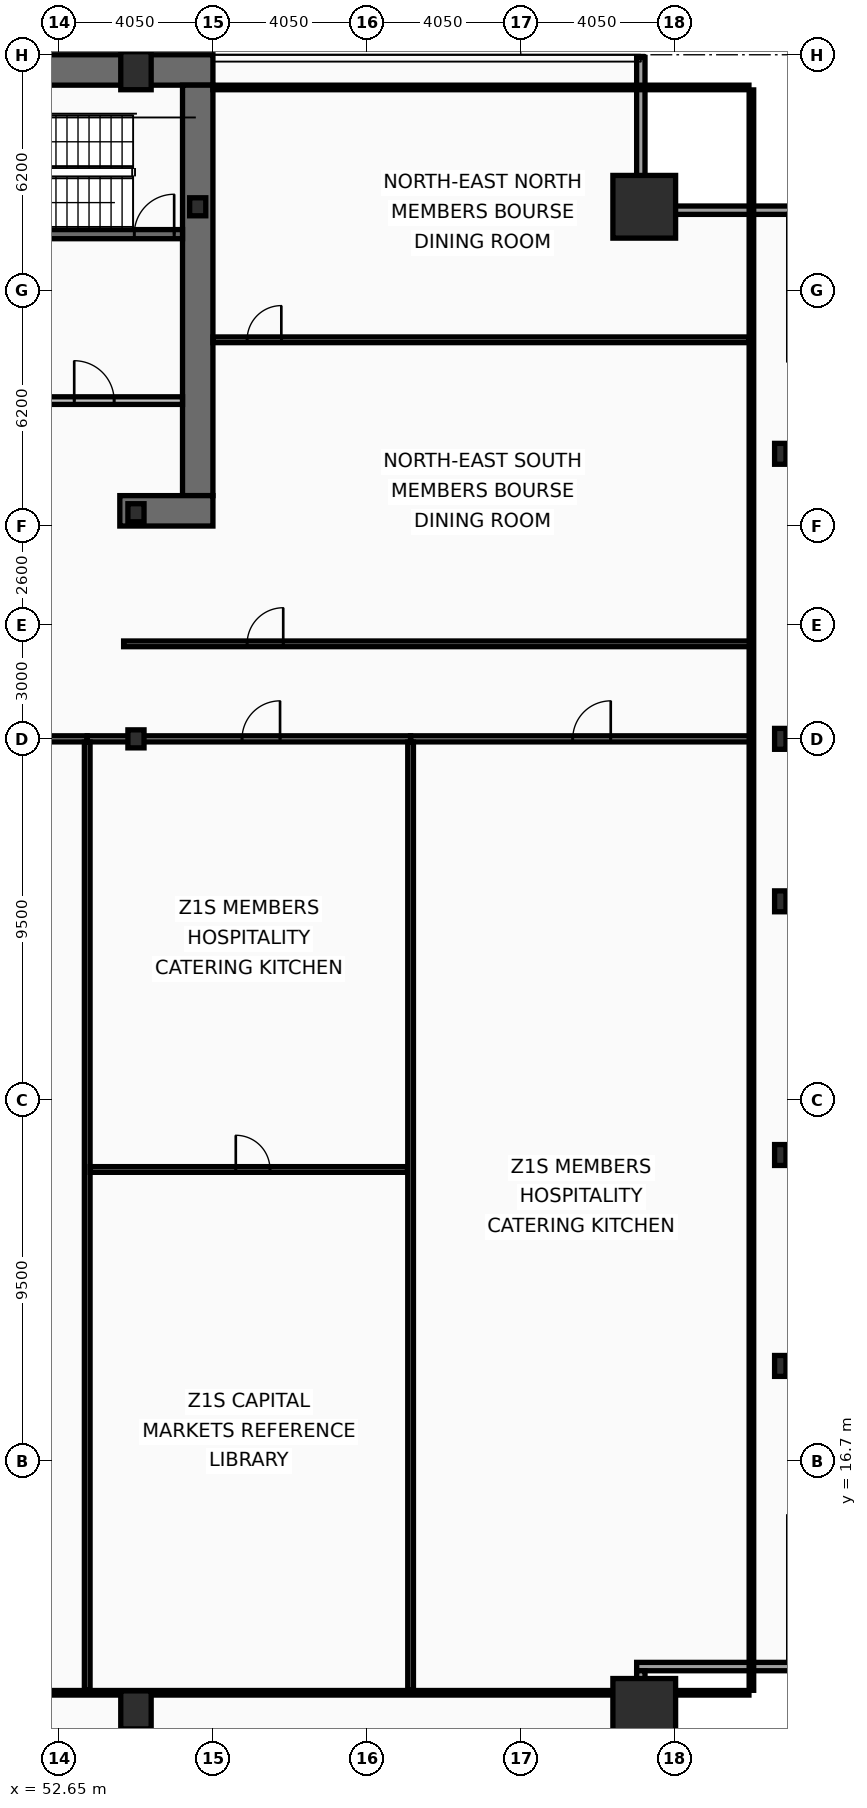
"""IFC4 building model, lengths in metres.
Left out: names, types, materials, properties, quantities, classifications, styles, units other than length and angle.
Written with IfcOpenShell. Run it as: python <this file> out.ifc"""

import sys

from ifc_helpers import new_model, si_unit, direction, frame, frame_2d, origin, origin_2d, place, context, subcontext, project, spatial, rectangle, hollow_rectangle, i_section, extrude, element, fill, save


model = new_model("IFC4")
c1 = context("Model", 3, precision=1e-05, world=origin(), true_north=direction((0.0, 1.0)))
c2 = subcontext(c1, "Body", "Model", "MODEL_VIEW")
j1 = project(units=[si_unit("LENGTHUNIT", "METRE"), si_unit("PLANEANGLEUNIT", "RADIAN")], contexts=[c1])
p1 = place(None, origin())
s1 = spatial("IfcSite", under=j1, at=p1, CompositionType="ELEMENT")
p2 = place(p1, origin())
s2 = spatial("IfcBuilding", under=s1, at=p2, CompositionType="ELEMENT")
p3 = place(p2, frame((0.0, 0.0, 49.8)))
s3 = spatial("IfcBuildingStorey", under=s2, at=p3, CompositionType="ELEMENT", Elevation=49.8)
p4 = place(p3, frame((16.2, 53.3, 0.0), z_axis=(0.0, 0.0, 1.0), x_axis=(1.0, 0.0, 0.0)))
e1 = element("IfcWall", 1, at=p4, inside=s3, PredefinedType="SHEAR", context=c2, shape_type="SweptSolid", body=[
    extrude(rectangle(XDim=40.5, YDim=0.8, at=frame_2d((20.25, 0.0))), origin(), (0.0, 0.0, 1.0), 3.82),
])
p5 = place(p3, frame((56.3, 52.9, 0.0), z_axis=(0.0, 0.0, 1.0), x_axis=(0.0, -1.0, 0.0)))
e2 = element("IfcWall", 2, at=p5, inside=s3, PredefinedType="SHEAR", context=c2, shape_type="SweptSolid", body=[
    extrude(rectangle(XDim=10.8, YDim=0.8, at=frame_2d((5.4, 0.0))), origin(), (0.0, 0.0, 1.0), 3.82),
])
p6 = place(p3, frame((56.7, 41.7, 0.0), z_axis=(0.0, 0.0, 1.0), x_axis=(-1.0, 0.0, 0.0)))
e3 = element("IfcWall", 3, at=p6, inside=s3, PredefinedType="SHEAR", context=c2, shape_type="SweptSolid", body=[
    extrude(rectangle(XDim=2.45, YDim=0.8, at=frame_2d((1.225, 0.0))), origin(), (0.0, 0.0, 1.0), 3.82),
])
p7 = place(p3, frame((48.63, 48.98, 0.0), z_axis=(0.0, 0.0, 1.0), x_axis=(1.0, 0.0, 0.0)))
e4 = element("IfcWall", 4, at=p7, inside=s3, PredefinedType="SHEAR", context=c2, shape_type="SweptSolid", body=[
    extrude(rectangle(XDim=7.27, YDim=0.24, at=frame_2d((3.635, 0.0))), origin(), (0.0, 0.0, 1.0), 3.82),
])
p8 = place(p7, frame((6.0, 0.0, 0.0)))
e5 = element("IfcOpeningElement", 5, at=p8, cuts=e4, PredefinedType="OPENING", context=c2, shape_type="SweptSolid", body=[
    extrude(rectangle(XDim=1.05, YDim=2.15, at=frame_2d((0.525, 1.075))), frame((0.0, 0.13, 0.0), z_axis=(0.0, -1.0, 0.0), x_axis=(1.0, 0.0, 0.0)), (0.0, 0.0, 1.0), 0.26),
])
for number, where, z_axis, x_axis in (
    (6, (68.05, 10.15, 0.0), (0.0, 0.0, 1.0), (1.0, 0.0, 0.0)),
    (7, (68.05, 49.7, 0.0), (0.0, 0.0, 1.0), (1.0, 0.0, 0.0)),
):
    element("IfcColumn", number, at=place(p3, frame(where, z_axis=z_axis, x_axis=x_axis)), inside=s3, PredefinedType="COLUMN", context=c2, shape_type="SweptSolid", body=[
        extrude(hollow_rectangle(XDim=1.65, YDim=1.65, WallThickness=0.075, at=origin_2d()), origin(), (0.0, 0.0, 1.0), 4.0),
    ])
for number, where, z_axis, x_axis in (
    (8, (54.675, 10.15, 0.0), (0.0, 0.0, 1.0), (1.0, 0.0, 0.0)),
    (9, (54.675, 53.28, 0.0), (0.0, 0.0, 1.0), (1.0, 0.0, 0.0)),
):
    element("IfcColumn", number, at=place(p3, frame(where, z_axis=z_axis, x_axis=x_axis)), inside=s3, PredefinedType="COLUMN", context=c2, shape_type="SweptSolid", body=[
        extrude(hollow_rectangle(XDim=0.8, YDim=1.0, WallThickness=0.055, at=origin_2d()), origin(), (0.0, 0.0, 1.0), 4.0),
    ])
for number, where, z_axis, x_axis in (
    (10, (71.63, 19.2, 0.0), (0.0, 0.0, 1.0), (1.0, 0.0, 0.0)),
    (11, (71.63, 24.75, 0.0), (0.0, 0.0, 1.0), (1.0, 0.0, 0.0)),
    (12, (71.63, 31.425, 0.0), (0.0, 0.0, 1.0), (1.0, 0.0, 0.0)),
    (13, (71.63, 35.7, 0.0), (0.0, 0.0, 1.0), (1.0, 0.0, 0.0)),
    (14, (71.63, 43.2, 0.0), (0.0, 0.0, 1.0), (1.0, 0.0, 0.0)),
):
    element("IfcColumn", number, at=place(p3, frame(where, z_axis=z_axis, x_axis=x_axis)), inside=s3, PredefinedType="COLUMN", context=c2, shape_type="SweptSolid", body=[
        extrude(i_section(OverallWidth=0.3, OverallDepth=0.55, WebThickness=0.015, FlangeThickness=0.029, at=origin_2d()), origin(), (0.0, 0.0, 1.0), 4.0),
    ])
for number, where, z_axis, x_axis in (
    (15, (56.3, 49.7, 0.0), (0.0, 0.0, 1.0), (1.0, 0.0, 0.0)),
    (16, (54.675, 35.7, 0.0), (0.0, 0.0, 1.0), (1.0, 0.0, 0.0)),
    (17, (54.675, 41.65, 0.0), (0.0, 0.0, 1.0), (1.0, 0.0, 0.0)),
):
    element("IfcColumn", number, at=place(p3, frame(where, z_axis=z_axis, x_axis=x_axis)), inside=s3, PredefinedType="COLUMN", context=c2, shape_type="SweptSolid", body=[
        extrude(i_section(OverallWidth=0.424, OverallDepth=0.474, WebThickness=0.048, FlangeThickness=0.077, at=origin_2d()), origin(), (0.0, 0.0, 1.0), 4.0),
    ])
p9 = place(p3, frame((67.96, 53.63, 0.0), z_axis=(0.0, 0.0, 1.0), x_axis=(0.0, -1.0, 0.0)))
e18 = element("IfcWall", 18, at=p9, inside=s3, PredefinedType="SOLIDWALL", context=c2, shape_type="SweptSolid", body=[
    extrude(rectangle(XDim=3.91, YDim=0.22, at=frame_2d((1.955, 0.0))), origin(), (0.0, 0.0, 1.0), 3.16),
])
for number, where, z_axis, x_axis in (
    (19, (67.85, 49.61, 0.0), (0.0, 0.0, 1.0), (1.0, 0.0, 0.0)),
    (20, (72.07, 11.29, 0.0), (0.0, 0.0, 1.0), (-1.0, 0.0, 0.0)),
):
    element("IfcWall", number, at=place(p3, frame(where, z_axis=z_axis, x_axis=x_axis)), inside=s3, PredefinedType="SOLIDWALL", context=c2, shape_type="SweptSolid", body=[
        extrude(rectangle(XDim=4.22, YDim=0.22, at=frame_2d((2.11, 0.0))), origin(), (0.0, 0.0, 1.0), 3.16),
    ])
p10 = place(p3, frame((67.96, 11.18, 0.0), z_axis=(0.0, 0.0, 1.0), x_axis=(0.0, -1.0, 0.0)))
e21 = element("IfcWall", 21, at=p10, inside=s3, PredefinedType="SOLIDWALL", context=c2, shape_type="SweptSolid", body=[
    extrude(rectangle(XDim=3.91, YDim=0.22, at=frame_2d((1.955, 0.0))), origin(), (0.0, 0.0, 1.0), 3.16),
])
p11 = place(p3, frame((51.9, 44.6, 0.0), z_axis=(0.0, 0.0, 1.0), x_axis=(1.0, 0.0, 0.0)))
e22 = element("IfcWall", 22, at=p11, inside=s3, PredefinedType="PARTITIONING", context=c2, shape_type="SweptSolid", body=[
    extrude(rectangle(XDim=4.0, YDim=0.2, at=frame_2d((2.0, 0.0))), origin(), (0.0, 0.0, 1.0), 3.82),
])
p12 = place(p11, frame((1.15, 0.0, 0.0)))
e23 = element("IfcOpeningElement", 23, at=p12, cuts=e22, PredefinedType="OPENING", context=c2, shape_type="SweptSolid", body=[
    extrude(rectangle(XDim=1.05, YDim=2.15, at=frame_2d((0.525, 1.075))), frame((0.0, 0.11, 0.0), z_axis=(0.0, -1.0, 0.0), x_axis=(1.0, 0.0, 0.0)), (0.0, 0.0, 1.0), 0.22),
])
p13 = place(p3, frame((54.35, 38.2, 0.0), z_axis=(0.0, 0.0, 1.0), x_axis=(1.0, 0.0, 0.0)))
e24 = element("IfcWall", 24, at=p13, inside=s3, PredefinedType="PARTITIONING", context=c2, shape_type="SweptSolid", body=[
    extrude(rectangle(XDim=16.52, YDim=0.15, at=frame_2d((8.26, 0.0))), origin(), (0.0, 0.0, 1.0), 3.01),
])
p14 = place(p13, frame((3.25, 0.0, 0.0)))
e25 = element("IfcOpeningElement", 25, at=p14, cuts=e24, PredefinedType="OPENING", context=c2, shape_type="SweptSolid", body=[
    extrude(rectangle(XDim=0.95, YDim=2.05, at=frame_2d((0.475, 1.025))), frame((0.0, 0.085, 0.0), z_axis=(0.0, -1.0, 0.0), x_axis=(1.0, 0.0, 0.0)), (0.0, 0.0, 1.0), 0.17),
])
p15 = place(p3, frame((56.7, 46.2, 0.0), z_axis=(0.0, 0.0, 1.0), x_axis=(1.0, 0.0, 0.0)))
e26 = element("IfcWall", 26, at=p15, inside=s3, PredefinedType="PARTITIONING", context=c2, shape_type="SweptSolid", body=[
    extrude(rectangle(XDim=14.105, YDim=0.15, at=frame_2d((7.052, 0.0))), origin(), (0.0, 0.0, 1.0), 3.16),
])
p16 = place(p15, frame((0.9, 0.0, 0.0)))
e27 = element("IfcOpeningElement", 27, at=p16, cuts=e26, PredefinedType="OPENING", context=c2, shape_type="SweptSolid", body=[
    extrude(rectangle(XDim=0.9, YDim=2.05, at=frame_2d((0.45, 1.025))), frame((0.0, 0.085, 0.0), z_axis=(0.0, -1.0, 0.0), x_axis=(1.0, 0.0, 0.0)), (0.0, 0.0, 1.0), 0.17),
])
p17 = place(p3, frame((35.595, 35.7, 0.0), z_axis=(0.0, 0.0, 1.0), x_axis=(1.0, 0.0, 0.0)))
e28 = element("IfcWall", 28, at=p17, inside=s3, PredefinedType="PARTITIONING", context=c2, shape_type="SweptSolid", body=[
    extrude(rectangle(XDim=17.797, YDim=0.16, at=frame_2d((8.899, 0.0))), origin(), (0.0, 0.0, 1.0), 3.01),
])
p18 = place(p17, frame((7.975, 0.0, 0.0)))
e29 = element("IfcOpeningElement", 29, at=p18, cuts=e28, PredefinedType="OPENING", context=c2, shape_type="SweptSolid", body=[
    extrude(rectangle(XDim=1.6, YDim=2.15, at=frame_2d((0.8, 1.075))), frame((0.0, 0.09, 0.0), z_axis=(0.0, -1.0, 0.0), x_axis=(1.0, 0.0, 0.0)), (0.0, 0.0, 1.0), 0.18),
])
p19 = place(p3, frame((53.392, 35.7, 0.0), z_axis=(0.0, 0.0, 1.0), x_axis=(1.0, 0.0, 0.0)))
e30 = element("IfcWall", 30, at=p19, inside=s3, PredefinedType="PARTITIONING", context=c2, shape_type="SweptSolid", body=[
    extrude(rectangle(XDim=8.51, YDim=0.16, at=frame_2d((4.255, 0.0))), origin(), (0.0, 0.0, 1.0), 3.01),
])
p20 = place(p19, frame((4.074, 0.0, 0.0)))
e31 = element("IfcOpeningElement", 31, at=p20, cuts=e30, PredefinedType="OPENING", context=c2, shape_type="SweptSolid", body=[
    extrude(rectangle(XDim=1.0, YDim=2.05, at=frame_2d((0.5, 1.025))), frame((0.0, 0.09, 0.0), z_axis=(0.0, -1.0, 0.0), x_axis=(1.0, 0.0, 0.0)), (0.0, 0.0, 1.0), 0.18),
])
p21 = place(p3, frame((53.392, 10.665, 0.0), z_axis=(0.0, 0.0, 1.0), x_axis=(0.0, 1.0, 0.0)))
e32 = element("IfcWall", 32, at=p21, inside=s3, PredefinedType="PARTITIONING", context=c2, shape_type="SweptSolid", body=[
    extrude(rectangle(XDim=24.95, YDim=0.15, at=frame_2d((12.475, 0.0))), origin(), (0.0, 0.0, 1.0), 3.21),
])
p22 = place(p3, frame((53.472, 24.369, 0.0), z_axis=(0.0, 0.0, 1.0), x_axis=(1.0, 0.0, 0.0)))
e33 = element("IfcWall", 33, at=p22, inside=s3, PredefinedType="PARTITIONING", context=c2, shape_type="SweptSolid", body=[
    extrude(rectangle(XDim=8.349, YDim=0.15, at=frame_2d((4.175, 0.0))), origin(), (0.0, 0.0, 1.0), 3.01),
])
p23 = place(p22, frame((3.829, 0.0, 0.0)))
e34 = element("IfcOpeningElement", 34, at=p23, cuts=e33, PredefinedType="OPENING", context=c2, shape_type="SweptSolid", body=[
    extrude(rectangle(XDim=0.9, YDim=2.05, at=frame_2d((0.45, 1.025))), frame((0.0, 0.085, 0.0), z_axis=(0.0, -1.0, 0.0), x_axis=(1.0, 0.0, 0.0)), (0.0, 0.0, 1.0), 0.17),
])
p24 = place(p3, frame((61.902, 35.7, 0.0), z_axis=(0.0, 0.0, 1.0), x_axis=(1.0, 0.0, 0.0)))
e35 = element("IfcWall", 35, at=p24, inside=s3, PredefinedType="PARTITIONING", context=c2, shape_type="SweptSolid", body=[
    extrude(rectangle(XDim=8.968, YDim=0.16, at=frame_2d((4.484, 0.0))), origin(), (0.0, 0.0, 1.0), 3.01),
])
p25 = place(p24, frame((4.267, 0.0, 0.0)))
e36 = element("IfcOpeningElement", 36, at=p25, cuts=e35, PredefinedType="OPENING", context=c2, shape_type="SweptSolid", body=[
    extrude(rectangle(XDim=1.0, YDim=2.05, at=frame_2d((0.5, 1.025))), frame((0.0, 0.09, 0.0), z_axis=(0.0, -1.0, 0.0), x_axis=(1.0, 0.0, 0.0)), (0.0, 0.0, 1.0), 0.18),
])
p26 = place(p3, frame((61.902, 10.665, 0.0), z_axis=(0.0, 0.0, 1.0), x_axis=(0.0, 1.0, 0.0)))
e37 = element("IfcWall", 37, at=p26, inside=s3, PredefinedType="PARTITIONING", context=c2, shape_type="SweptSolid", body=[
    extrude(rectangle(XDim=24.95, YDim=0.15, at=frame_2d((12.475, 0.0))), origin(), (0.0, 0.0, 1.0), 3.01),
])
p27 = place(p3, frame((70.87, 10.665, 0.0), z_axis=(0.0, 0.0, 1.0), x_axis=(0.0, 1.0, 0.0)))
e38 = element("IfcWall", 38, at=p27, inside=s3, PredefinedType="PARTITIONING", context=c2, shape_type="SweptSolid", body=[
    extrude(rectangle(XDim=42.11, YDim=0.12, at=frame_2d((21.055, 0.0))), origin(), (0.0, 0.0, 1.0), 3.01),
])
p28 = place(p3, frame((56.7, 52.84, 0.0), z_axis=(0.0, 0.0, 1.0), x_axis=(1.0, 0.0, 0.0)))
e39 = element("IfcWall", 39, at=p28, inside=s3, PredefinedType="PARTITIONING", context=c2, shape_type="SweptSolid", body=[
    extrude(rectangle(XDim=14.105, YDim=0.12, at=frame_2d((7.052, 0.0))), origin(), (0.0, 0.0, 1.0), 3.82),
])
p29 = place(p3, frame((2.095, 10.6, 0.0), z_axis=(0.0, 0.0, 1.0), x_axis=(1.0, 0.0, 0.0)))
e40 = element("IfcWall", 40, at=p29, inside=s3, PredefinedType="PARTITIONING", context=c2, shape_type="SweptSolid", body=[
    extrude(rectangle(XDim=68.71, YDim=0.12, at=frame_2d((34.355, 0.0))), origin(), (0.0, 0.0, 1.0), 3.01),
])
p30 = place(p8, origin())
e41 = element("IfcDoor", 41, at=p30, inside=s3, OperationType="SINGLE_SWING_RIGHT", PredefinedType="DOOR", context=c2, shape_type="SweptSolid", body=[
    extrude(rectangle(XDim=1.05, YDim=2.15, at=frame_2d((0.525, 1.075))), frame((0.0, 0.025, 0.0), z_axis=(0.0, -1.0, 0.0), x_axis=(1.0, 0.0, 0.0)), (0.0, 0.0, 1.0), 0.05),
])
fill(e5, e41)
p31 = place(p12, origin())
e42 = element("IfcDoor", 42, at=p31, inside=s3, OperationType="SINGLE_SWING_LEFT", PredefinedType="DOOR", context=c2, shape_type="SweptSolid", body=[
    extrude(rectangle(XDim=1.05, YDim=2.15, at=frame_2d((0.525, 1.075))), frame((0.0, 0.025, 0.0), z_axis=(0.0, -1.0, 0.0), x_axis=(1.0, 0.0, 0.0)), (0.0, 0.0, 1.0), 0.05),
])
fill(e23, e42)
p32 = place(p14, origin())
e43 = element("IfcDoor", 43, at=p32, inside=s3, OperationType="SINGLE_SWING_RIGHT", PredefinedType="DOOR", context=c2, shape_type="SweptSolid", body=[
    extrude(rectangle(XDim=0.95, YDim=2.05, at=frame_2d((0.475, 1.025))), frame((0.0, 0.025, 0.0), z_axis=(0.0, -1.0, 0.0), x_axis=(1.0, 0.0, 0.0)), (0.0, 0.0, 1.0), 0.05),
])
fill(e25, e43)
p33 = place(p16, origin())
e44 = element("IfcDoor", 44, at=p33, inside=s3, OperationType="SINGLE_SWING_RIGHT", PredefinedType="DOOR", context=c2, shape_type="SweptSolid", body=[
    extrude(rectangle(XDim=0.9, YDim=2.05, at=frame_2d((0.45, 1.025))), frame((0.0, 0.025, 0.0), z_axis=(0.0, -1.0, 0.0), x_axis=(1.0, 0.0, 0.0)), (0.0, 0.0, 1.0), 0.05),
])
fill(e27, e44)
p34 = place(p20, origin())
e45 = element("IfcDoor", 45, at=p34, inside=s3, OperationType="SINGLE_SWING_RIGHT", PredefinedType="DOOR", context=c2, shape_type="SweptSolid", body=[
    extrude(rectangle(XDim=1.0, YDim=2.05, at=frame_2d((0.5, 1.025))), frame((0.0, 0.025, 0.0), z_axis=(0.0, -1.0, 0.0), x_axis=(1.0, 0.0, 0.0)), (0.0, 0.0, 1.0), 0.05),
])
fill(e31, e45)
p35 = place(p23, origin())
e46 = element("IfcDoor", 46, at=p35, inside=s3, OperationType="SINGLE_SWING_LEFT", PredefinedType="DOOR", context=c2, shape_type="SweptSolid", body=[
    extrude(rectangle(XDim=0.9, YDim=2.05, at=frame_2d((0.45, 1.025))), frame((0.0, 0.025, 0.0), z_axis=(0.0, -1.0, 0.0), x_axis=(1.0, 0.0, 0.0)), (0.0, 0.0, 1.0), 0.05),
])
fill(e34, e46)
p36 = place(p25, origin())
e47 = element("IfcDoor", 47, at=p36, inside=s3, OperationType="SINGLE_SWING_RIGHT", PredefinedType="DOOR", context=c2, shape_type="SweptSolid", body=[
    extrude(rectangle(XDim=1.0, YDim=2.05, at=frame_2d((0.5, 1.025))), frame((0.0, 0.025, 0.0), z_axis=(0.0, -1.0, 0.0), x_axis=(1.0, 0.0, 0.0)), (0.0, 0.0, 1.0), 0.05),
])
fill(e36, e47)
save(model, sys.argv[1])
